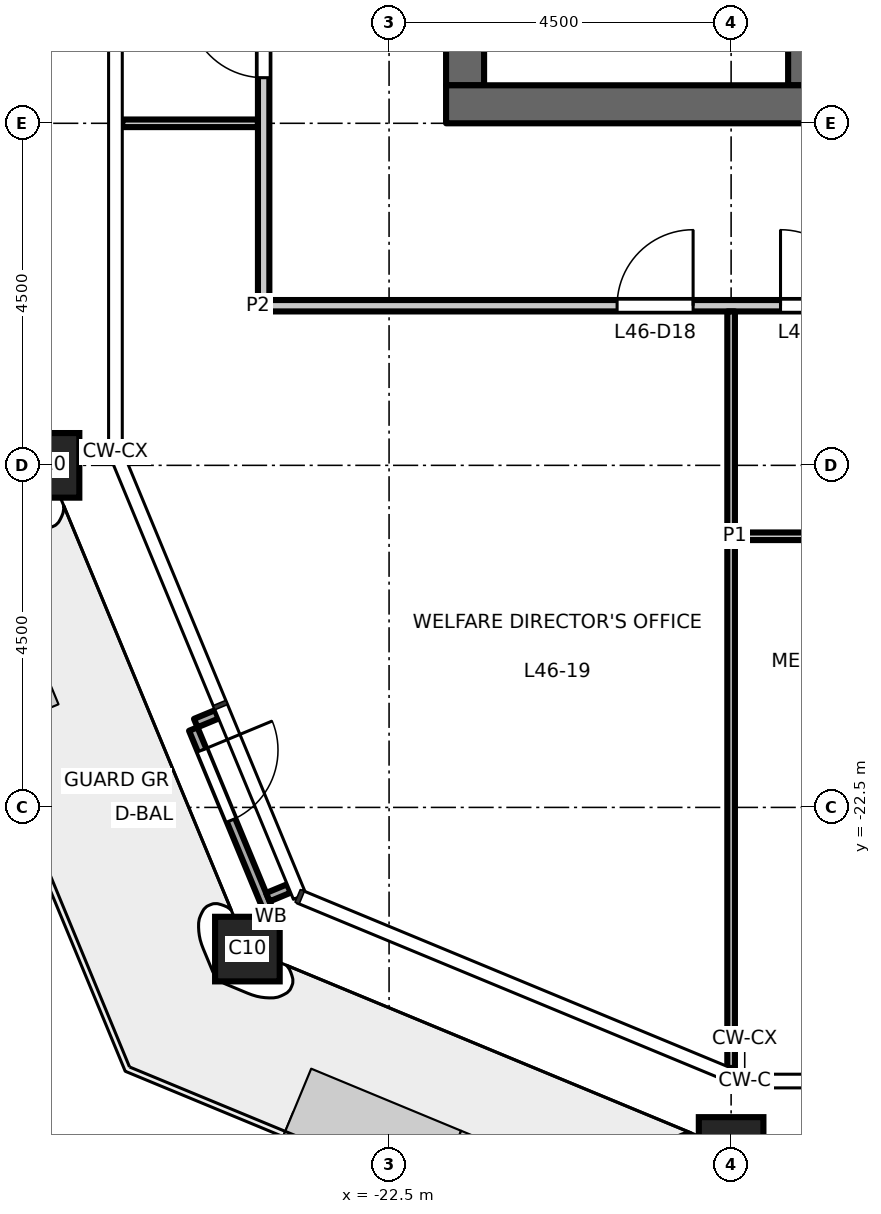
"""IFC4 building model, lengths in metres.
Left out: names, types, materials, properties, quantities, classifications, styles, units other than length and angle.
Written with IfcOpenShell. Run it as: python <this file> out.ifc"""

import sys

from ifc_helpers import new_model, si_unit, direction, frame, frame_2d, origin, origin_2d, place, context, subcontext, project, spatial, rectangle, hollow_rectangle, extrude, element, fill, save


model = new_model("IFC4")
c1 = context("Model", 3, precision=1e-05, world=origin(), true_north=direction((0.0, 1.0)))
c2 = subcontext(c1, "Body", "Model", "MODEL_VIEW")
j1 = project(units=[si_unit("LENGTHUNIT", "METRE"), si_unit("PLANEANGLEUNIT", "RADIAN")], contexts=[c1])
p1 = place(None, origin())
s1 = spatial("IfcSite", under=j1, at=p1, CompositionType="ELEMENT")
p2 = place(p1, origin())
s2 = spatial("IfcBuilding", under=s1, at=p2, CompositionType="ELEMENT")
p3 = place(p2, frame((0.0, 0.0, 215.2)))
s3 = spatial("IfcBuildingStorey", under=s2, at=p3, CompositionType="ELEMENT", Elevation=215.2)
for number, where, z_axis, x_axis in (
    (1, (-18.0, -27.0, 0.0), (0.0, 0.0, 1.0), (1.0, 0.0, 0.0)),
    (2, (-27.0, -18.0, 0.0), (0.0, 0.0, 1.0), (1.0, 0.0, 0.0)),
    (3, (-24.364, -24.364, 0.0), (0.0, 0.0, 1.0), (1.0, 0.0, 0.0)),
):
    element("IfcColumn", number, at=place(p3, frame(where, z_axis=z_axis, x_axis=x_axis)), inside=s3, PredefinedType="COLUMN", context=c2, shape_type="SweptSolid", body=[
        extrude(hollow_rectangle(XDim=0.85, YDim=0.85, WallThickness=0.05, at=origin_2d()), origin(), (0.0, 0.0, 1.0), 4.5),
    ])
p4 = place(p3, frame((-21.5, -13.0, 0.0), z_axis=(0.0, 0.0, 1.0), x_axis=(0.0, 1.0, 0.0)))
e4 = element("IfcWall", 4, at=p4, inside=s3, PredefinedType="SHEAR", context=c2, shape_type="SweptSolid", body=[
    extrude(rectangle(XDim=26.0, YDim=0.5, at=frame_2d((13.0, 0.0))), origin(), (0.0, 0.0, 1.0), 4.35),
])
p5 = place(p4, frame((16.825, 0.0, 0.0)))
e5 = element("IfcOpeningElement", 5, at=p5, cuts=e4, PredefinedType="OPENING", context=c2, shape_type="SweptSolid", body=[
    extrude(rectangle(XDim=1.8, YDim=2.1, at=frame_2d((0.9, 1.05))), frame((0.0, 0.26, 0.0), z_axis=(0.0, -1.0, 0.0), x_axis=(1.0, 0.0, 0.0)), (0.0, 0.0, 1.0), 0.52),
])
p6 = place(p4, frame((7.375, 0.0, 0.0)))
e6 = element("IfcOpeningElement", 6, at=p6, cuts=e4, PredefinedType="OPENING", context=c2, shape_type="SweptSolid", body=[
    extrude(rectangle(XDim=1.8, YDim=2.1, at=frame_2d((0.9, 1.05))), frame((0.0, 0.26, 0.0), z_axis=(0.0, -1.0, 0.0), x_axis=(1.0, 0.0, 0.0)), (0.0, 0.0, 1.0), 0.52),
])
p7 = place(p4, frame((14.125, 0.0, 0.0)))
e7 = element("IfcOpeningElement", 7, at=p7, cuts=e4, PredefinedType="OPENING", context=c2, shape_type="SweptSolid", body=[
    extrude(rectangle(XDim=0.9, YDim=2.1, at=frame_2d((0.45, 1.05))), frame((0.0, 0.26, 0.0), z_axis=(0.0, -1.0, 0.0), x_axis=(1.0, 0.0, 0.0)), (0.0, 0.0, 1.0), 0.52),
])
p8 = place(p3, frame((-17.0, -13.0, 0.0), z_axis=(0.0, 0.0, 1.0), x_axis=(0.0, 1.0, 0.0)))
e8 = element("IfcWall", 8, at=p8, inside=s3, PredefinedType="SHEAR", context=c2, shape_type="SweptSolid", body=[
    extrude(rectangle(XDim=6.575, YDim=0.5, at=frame_2d((3.288, 0.0))), origin(), (0.0, 0.0, 1.0), 4.35),
])
p9 = place(p3, frame((-8.25, -13.25, 0.0), z_axis=(0.0, 0.0, 1.0), x_axis=(-1.0, 0.0, 0.0)))
e9 = element("IfcWall", 9, at=p9, inside=s3, PredefinedType="SHEAR", context=c2, shape_type="SweptSolid", body=[
    extrude(rectangle(XDim=13.5, YDim=0.5, at=frame_2d((6.75, 0.0))), origin(), (0.0, 0.0, 1.0), 4.35),
])
p10 = place(p3, frame((-24.766, -21.276, 0.0), z_axis=(0.0, 0.0, 1.0), x_axis=(-0.923917630863, -0.382591441855, 0.0)))
e10 = element("IfcWall", 10, at=p10, inside=s3, PredefinedType="STANDARD", context=c2, shape_type="SweptSolid", body=[
    extrude(rectangle(XDim=0.3, YDim=0.12, at=frame_2d((0.15, 0.0))), origin(), (0.0, 0.0, 1.0), 4.35),
])
p11 = place(p3, frame((-23.818, -23.566, 0.0), z_axis=(0.0, 0.0, 1.0), x_axis=(-0.923629715641, -0.383285987724, 0.0)))
e11 = element("IfcWall", 11, at=p11, inside=s3, PredefinedType="STANDARD", context=c2, shape_type="SweptSolid", body=[
    extrude(rectangle(XDim=0.3, YDim=0.12, at=frame_2d((0.15, 0.0))), origin(), (0.0, 0.0, 1.0), 4.35),
])
p12 = place(p3, frame((-25.076, -21.469, 0.0), z_axis=(0.0, 0.0, 1.0), x_axis=(0.382636771556, -0.923898858671, 0.0)))
e12 = element("IfcWall", 12, at=p12, inside=s3, PredefinedType="STANDARD", context=c2, shape_type="SweptSolid", body=[
    extrude(rectangle(XDim=2.673, YDim=0.12, at=frame_2d((1.337, 0.0))), origin(), (0.0, 0.0, 1.0), 4.35),
])
p13 = place(p12, frame((0.3, 0.0, 0.0)))
e13 = element("IfcOpeningElement", 13, at=p13, cuts=e12, PredefinedType="OPENING", context=c2, shape_type="SweptSolid", body=[
    extrude(rectangle(XDim=1.0, YDim=2.4, at=frame_2d((0.5, 1.2))), frame((0.0, 0.07, 0.0), z_axis=(0.0, -1.0, 0.0), x_axis=(1.0, 0.0, 0.0)), (0.0, 0.0, 1.0), 0.14),
])
p14 = place(p3, frame((-17.95, -18.933, 0.0), z_axis=(0.0, 0.0, 1.0), x_axis=(1.0, 0.0, 0.0)))
e14 = element("IfcWall", 14, at=p14, inside=s3, PredefinedType="PARTITIONING", context=c2, shape_type="SweptSolid", body=[
    extrude(rectangle(XDim=17.9, YDim=0.1, at=frame_2d((8.95, 0.0))), origin(), (0.0, 0.0, 1.0), 4.35),
])
p15 = place(p14, frame((7.35, 0.0, 0.0)))
e15 = element("IfcOpeningElement", 15, at=p15, cuts=e14, PredefinedType="OPENING", context=c2, shape_type="SweptSolid", body=[
    extrude(rectangle(XDim=1.0, YDim=2.1, at=frame_2d((0.5, 1.05))), frame((0.0, 0.06, 0.0), z_axis=(0.0, -1.0, 0.0), x_axis=(1.0, 0.0, 0.0)), (0.0, 0.0, 1.0), 0.12),
])
p16 = place(p14, frame((16.35, 0.0, 0.0)))
e16 = element("IfcOpeningElement", 16, at=p16, cuts=e14, PredefinedType="OPENING", context=c2, shape_type="SweptSolid", body=[
    extrude(rectangle(XDim=1.0, YDim=2.1, at=frame_2d((0.5, 1.05))), frame((0.0, 0.06, 0.0), z_axis=(0.0, -1.0, 0.0), x_axis=(1.0, 0.0, 0.0)), (0.0, 0.0, 1.0), 0.12),
])
p17 = place(p3, frame((-24.225, -15.9, 0.0), z_axis=(0.0, 0.0, 1.0), x_axis=(1.0, 0.0, 0.0)))
e17 = element("IfcWall", 17, at=p17, inside=s3, PredefinedType="PARTITIONING", context=c2, shape_type="SweptSolid", body=[
    extrude(rectangle(XDim=48.45, YDim=0.15, at=frame_2d((24.225, 0.0))), origin(), (0.0, 0.0, 1.0), 4.35),
])
p18 = place(p17, frame((6.875, 0.0, 0.0)))
e18 = element("IfcOpeningElement", 18, at=p18, cuts=e17, PredefinedType="OPENING", context=c2, shape_type="SweptSolid", body=[
    extrude(rectangle(XDim=1.0, YDim=2.1, at=frame_2d((0.5, 1.05))), frame((0.0, 0.085, 0.0), z_axis=(0.0, -1.0, 0.0), x_axis=(1.0, 0.0, 0.0)), (0.0, 0.0, 1.0), 0.17),
])
p19 = place(p17, frame((15.875, 0.0, 0.0)))
e19 = element("IfcOpeningElement", 19, at=p19, cuts=e17, PredefinedType="OPENING", context=c2, shape_type="SweptSolid", body=[
    extrude(rectangle(XDim=1.0, YDim=2.1, at=frame_2d((0.5, 1.05))), frame((0.0, 0.085, 0.0), z_axis=(0.0, -1.0, 0.0), x_axis=(1.0, 0.0, 0.0)), (0.0, 0.0, 1.0), 0.17),
])
p20 = place(p17, frame((24.875, 0.0, 0.0)))
e20 = element("IfcOpeningElement", 20, at=p20, cuts=e17, PredefinedType="OPENING", context=c2, shape_type="SweptSolid", body=[
    extrude(rectangle(XDim=1.0, YDim=2.1, at=frame_2d((0.5, 1.05))), frame((0.0, 0.085, 0.0), z_axis=(0.0, -1.0, 0.0), x_axis=(1.0, 0.0, 0.0)), (0.0, 0.0, 1.0), 0.17),
])
p21 = place(p17, frame((40.625, 0.0, 0.0)))
e21 = element("IfcOpeningElement", 21, at=p21, cuts=e17, PredefinedType="OPENING", context=c2, shape_type="SweptSolid", body=[
    extrude(rectangle(XDim=1.0, YDim=2.1, at=frame_2d((0.5, 1.05))), frame((0.0, 0.085, 0.0), z_axis=(0.0, -1.0, 0.0), x_axis=(1.0, 0.0, 0.0)), (0.0, 0.0, 1.0), 0.17),
])
p22 = place(p17, frame((4.725, 0.0, 0.0)))
e22 = element("IfcOpeningElement", 22, at=p22, cuts=e17, PredefinedType="OPENING", context=c2, shape_type="SweptSolid", body=[
    extrude(rectangle(XDim=1.0, YDim=2.1, at=frame_2d((0.5, 1.05))), frame((0.0, 0.085, 0.0), z_axis=(0.0, -1.0, 0.0), x_axis=(1.0, 0.0, 0.0)), (0.0, 0.0, 1.0), 0.17),
])
p23 = place(p17, frame((42.875, 0.0, 0.0)))
e23 = element("IfcOpeningElement", 23, at=p23, cuts=e17, PredefinedType="OPENING", context=c2, shape_type="SweptSolid", body=[
    extrude(rectangle(XDim=1.0, YDim=2.1, at=frame_2d((0.5, 1.05))), frame((0.0, 0.085, 0.0), z_axis=(0.0, -1.0, 0.0), x_axis=(1.0, 0.0, 0.0)), (0.0, 0.0, 1.0), 0.17),
])
p24 = place(p3, frame((-26.01, -13.5, 0.0), z_axis=(0.0, 0.0, 1.0), x_axis=(1.0, 0.0, 0.0)))
e24 = element("IfcWall", 24, at=p24, inside=s3, PredefinedType="PARTITIONING", context=c2, shape_type="SweptSolid", body=[
    extrude(rectangle(XDim=1.785, YDim=0.1, at=frame_2d((0.893, 0.0))), origin(), (0.0, 0.0, 1.0), 3.95),
])
p25 = place(p3, frame((-24.15, -15.825, 0.0), z_axis=(0.0, 0.0, 1.0), x_axis=(0.0, 1.0, 0.0)))
e25 = element("IfcWall", 25, at=p25, inside=s3, PredefinedType="PARTITIONING", context=c2, shape_type="SweptSolid", body=[
    extrude(rectangle(XDim=31.65, YDim=0.15, at=frame_2d((15.825, 0.0))), origin(), (0.0, 0.0, 1.0), 4.35),
])
p26 = place(p25, frame((2.925, 0.0, 0.0)))
e26 = element("IfcOpeningElement", 26, at=p26, cuts=e25, PredefinedType="OPENING", context=c2, shape_type="SweptSolid", body=[
    extrude(rectangle(XDim=1.0, YDim=2.1, at=frame_2d((0.5, 1.05))), frame((0.0, 0.085, 0.0), z_axis=(0.0, -1.0, 0.0), x_axis=(1.0, 0.0, 0.0)), (0.0, 0.0, 1.0), 0.17),
])
p27 = place(p25, frame((14.175, 0.0, 0.0)))
e27 = element("IfcOpeningElement", 27, at=p27, cuts=e25, PredefinedType="OPENING", context=c2, shape_type="SweptSolid", body=[
    extrude(rectangle(XDim=1.0, YDim=2.1, at=frame_2d((0.5, 1.05))), frame((0.0, 0.085, 0.0), z_axis=(0.0, -1.0, 0.0), x_axis=(1.0, 0.0, 0.0)), (0.0, 0.0, 1.0), 0.17),
])
p28 = place(p25, frame((16.425, 0.0, 0.0)))
e28 = element("IfcOpeningElement", 28, at=p28, cuts=e25, PredefinedType="OPENING", context=c2, shape_type="SweptSolid", body=[
    extrude(rectangle(XDim=1.0, YDim=2.1, at=frame_2d((0.5, 1.05))), frame((0.0, 0.085, 0.0), z_axis=(0.0, -1.0, 0.0), x_axis=(1.0, 0.0, 0.0)), (0.0, 0.0, 1.0), 0.17),
])
p29 = place(p25, frame((27.675, 0.0, 0.0)))
e29 = element("IfcOpeningElement", 29, at=p29, cuts=e25, PredefinedType="OPENING", context=c2, shape_type="SweptSolid", body=[
    extrude(rectangle(XDim=1.0, YDim=2.1, at=frame_2d((0.5, 1.05))), frame((0.0, 0.085, 0.0), z_axis=(0.0, -1.0, 0.0), x_axis=(1.0, 0.0, 0.0)), (0.0, 0.0, 1.0), 0.17),
])
p30 = place(p3, frame((-18.0, -25.928, 0.0), z_axis=(0.0, 0.0, 1.0), x_axis=(0.0, 1.0, 0.0)))
e30 = element("IfcWall", 30, at=p30, inside=s3, PredefinedType="PARTITIONING", context=c2, shape_type="SweptSolid", body=[
    extrude(rectangle(XDim=9.953, YDim=0.1, at=frame_2d((4.977, 0.0))), origin(), (0.0, 0.0, 1.0), 3.65),
])
p31 = place(p13, origin())
e31 = element("IfcDoor", 31, at=p31, inside=s3, OperationType="SINGLE_SWING_LEFT", PredefinedType="DOOR", context=c2, shape_type="SweptSolid", body=[
    extrude(rectangle(XDim=1.0, YDim=2.4, at=frame_2d((0.5, 1.2))), frame((0.0, 0.025, 0.0), z_axis=(0.0, -1.0, 0.0), x_axis=(1.0, 0.0, 0.0)), (0.0, 0.0, 1.0), 0.05),
])
fill(e13, e31)
p32 = place(p18, origin())
e32 = element("IfcDoor", 32, at=p32, inside=s3, OperationType="SINGLE_SWING_LEFT", PredefinedType="DOOR", context=c2, shape_type="SweptSolid", body=[
    extrude(rectangle(XDim=1.0, YDim=2.1, at=frame_2d((0.5, 1.05))), frame((0.0, 0.025, 0.0), z_axis=(0.0, -1.0, 0.0), x_axis=(1.0, 0.0, 0.0)), (0.0, 0.0, 1.0), 0.05),
])
fill(e18, e32)
p33 = place(p22, origin())
e33 = element("IfcDoor", 33, at=p33, inside=s3, OperationType="SINGLE_SWING_RIGHT", PredefinedType="DOOR", context=c2, shape_type="SweptSolid", body=[
    extrude(rectangle(XDim=1.0, YDim=2.1, at=frame_2d((0.5, 1.05))), frame((0.0, 0.025, 0.0), z_axis=(0.0, -1.0, 0.0), x_axis=(1.0, 0.0, 0.0)), (0.0, 0.0, 1.0), 0.05),
])
fill(e22, e33)
p34 = place(p26, origin())
e34 = element("IfcDoor", 34, at=p34, inside=s3, OperationType="SINGLE_SWING_RIGHT", PredefinedType="DOOR", context=c2, shape_type="SweptSolid", body=[
    extrude(rectangle(XDim=1.0, YDim=2.1, at=frame_2d((0.5, 1.05))), frame((0.0, 0.025, 0.0), z_axis=(0.0, -1.0, 0.0), x_axis=(1.0, 0.0, 0.0)), (0.0, 0.0, 1.0), 0.05),
])
fill(e26, e34)
save(model, sys.argv[1])
